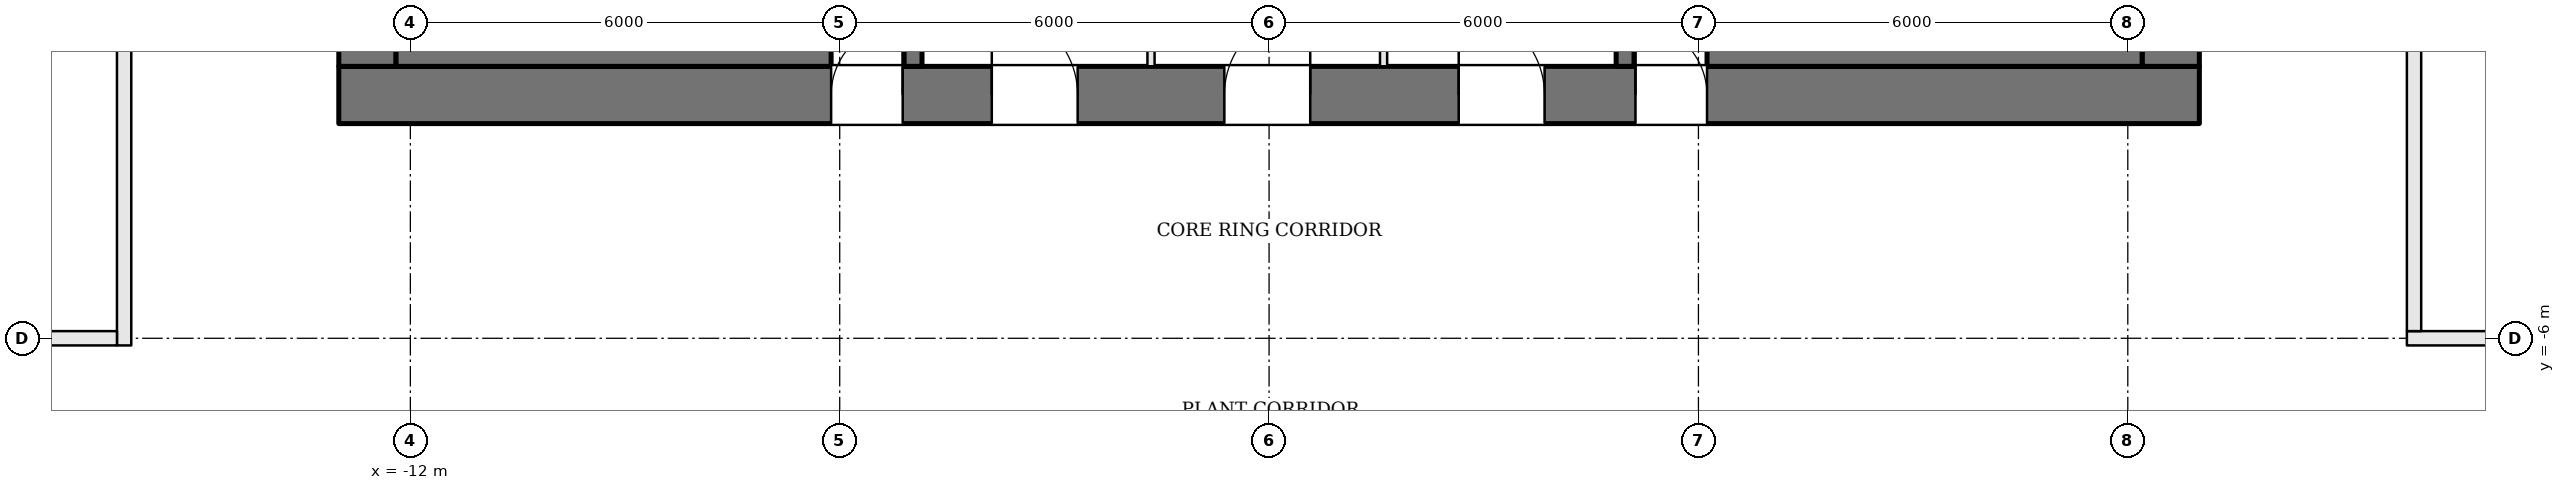
"""IFC4 building model, lengths in metres.
Left out: names, types, materials, properties, quantities, classifications, styles, units other than length and angle.
Written with IfcOpenShell. Run it as: python <this file> out.ifc"""

import sys

from ifc_helpers import new_model, si_unit, direction, frame, frame_2d, origin, place, context, subcontext, project, spatial, rectangle, extrude, element, fill, save


model = new_model("IFC4")
c1 = context("Model", 3, precision=1e-05, world=origin(), true_north=direction((0.0, 1.0)))
c2 = subcontext(c1, "Body", "Model", "MODEL_VIEW")
j1 = project(units=[si_unit("LENGTHUNIT", "METRE"), si_unit("PLANEANGLEUNIT", "RADIAN")], contexts=[c1])
p1 = place(None, origin())
s1 = spatial("IfcSite", under=j1, at=p1, CompositionType="ELEMENT")
p2 = place(p1, origin())
s2 = spatial("IfcBuilding", under=s1, at=p2, CompositionType="ELEMENT")
p3 = place(p2, frame((0.0, 0.0, 216.9)))
s3 = spatial("IfcBuildingStorey", under=s2, at=p3, CompositionType="ELEMENT", Elevation=216.9)
p4 = place(p3, frame((-13.0, -2.6, 0.0), z_axis=(0.0, 0.0, 1.0), x_axis=(1.0, 0.0, 0.0)))
e1 = element("IfcWall", 1, at=p4, inside=s3, PredefinedType="SHEAR", context=c2, shape_type="SweptSolid", body=[
    extrude(rectangle(XDim=26.0, YDim=0.8, at=frame_2d((13.0, 0.0))), origin(), (0.0, 0.0, 1.0), 4.5),
])
p5 = place(p4, frame((9.125, 0.0, 0.0)))
e2 = element("IfcOpeningElement", 2, at=p5, cuts=e1, PredefinedType="OPENING", context=c2, shape_type="SweptSolid", body=[
    extrude(rectangle(XDim=1.2, YDim=2.1, at=frame_2d((0.6, 1.05))), frame((0.0, 0.41, 0.0), z_axis=(0.0, -1.0, 0.0), x_axis=(1.0, 0.0, 0.0)), (0.0, 0.0, 1.0), 0.82),
])
p6 = place(p4, frame((12.375, 0.0, 0.0)))
e3 = element("IfcOpeningElement", 3, at=p6, cuts=e1, PredefinedType="OPENING", context=c2, shape_type="SweptSolid", body=[
    extrude(rectangle(XDim=1.2, YDim=2.1, at=frame_2d((0.6, 1.05))), frame((0.0, 0.41, 0.0), z_axis=(0.0, -1.0, 0.0), x_axis=(1.0, 0.0, 0.0)), (0.0, 0.0, 1.0), 0.82),
])
p7 = place(p4, frame((15.65, 0.0, 0.0)))
e4 = element("IfcOpeningElement", 4, at=p7, cuts=e1, PredefinedType="OPENING", context=c2, shape_type="SweptSolid", body=[
    extrude(rectangle(XDim=1.2, YDim=2.1, at=frame_2d((0.6, 1.05))), frame((0.0, 0.41, 0.0), z_axis=(0.0, -1.0, 0.0), x_axis=(1.0, 0.0, 0.0)), (0.0, 0.0, 1.0), 0.82),
])
p8 = place(p4, frame((6.88, 0.0, 0.0)))
e5 = element("IfcOpeningElement", 5, at=p8, cuts=e1, PredefinedType="OPENING", context=c2, shape_type="SweptSolid", body=[
    extrude(rectangle(XDim=1.0, YDim=2.1, at=frame_2d((0.5, 1.05))), frame((0.0, 0.41, 0.0), z_axis=(0.0, -1.0, 0.0), x_axis=(1.0, 0.0, 0.0)), (0.0, 0.0, 1.0), 0.82),
])
p9 = place(p4, frame((18.12, 0.0, 0.0)))
e6 = element("IfcOpeningElement", 6, at=p9, cuts=e1, PredefinedType="OPENING", context=c2, shape_type="SweptSolid", body=[
    extrude(rectangle(XDim=1.0, YDim=2.1, at=frame_2d((0.5, 1.05))), frame((0.0, 0.41, 0.0), z_axis=(0.0, -1.0, 0.0), x_axis=(1.0, 0.0, 0.0)), (0.0, 0.0, 1.0), 0.82),
])
p10 = place(p3, frame((12.6, -2.2, 0.0), z_axis=(0.0, 0.0, 1.0), x_axis=(0.0, 1.0, 0.0)))
e7 = element("IfcWall", 7, at=p10, inside=s3, PredefinedType="SHEAR", context=c2, shape_type="SweptSolid", body=[
    extrude(rectangle(XDim=13.4, YDim=0.8, at=frame_2d((6.7, 0.0))), origin(), (0.0, 0.0, 1.0), 4.5),
])
p11 = place(p10, frame((7.4, 0.0, 0.0)))
e8 = element("IfcOpeningElement", 8, at=p11, cuts=e7, PredefinedType="OPENING", context=c2, shape_type="SweptSolid", body=[
    extrude(rectangle(XDim=1.8, YDim=2.1, at=frame_2d((0.9, 1.05))), frame((0.0, 0.41, 0.0), z_axis=(0.0, -1.0, 0.0), x_axis=(1.0, 0.0, 0.0)), (0.0, 0.0, 1.0), 0.82),
])
p12 = place(p3, frame((-12.6, -2.2, 0.0), z_axis=(0.0, 0.0, 1.0), x_axis=(0.0, 1.0, 0.0)))
e9 = element("IfcWall", 9, at=p12, inside=s3, PredefinedType="SHEAR", context=c2, shape_type="SweptSolid", body=[
    extrude(rectangle(XDim=13.4, YDim=0.8, at=frame_2d((6.7, 0.0))), origin(), (0.0, 0.0, 1.0), 4.5),
])
p13 = place(p12, frame((4.2, 0.0, 0.0)))
e10 = element("IfcOpeningElement", 10, at=p13, cuts=e9, PredefinedType="OPENING", context=c2, shape_type="SweptSolid", body=[
    extrude(rectangle(XDim=1.8, YDim=2.1, at=frame_2d((0.9, 1.05))), frame((0.0, 0.41, 0.0), z_axis=(0.0, -1.0, 0.0), x_axis=(1.0, 0.0, 0.0)), (0.0, 0.0, 1.0), 0.82),
])
p14 = place(p3, frame((-4.975, -2.2, 0.0), z_axis=(0.0, 0.0, 1.0), x_axis=(0.0, 1.0, 0.0)))
e11 = element("IfcWall", 11, at=p14, inside=s3, PredefinedType="SOLIDWALL", context=c2, shape_type="SweptSolid", body=[
    extrude(rectangle(XDim=13.4, YDim=0.25, at=frame_2d((6.7, 0.0))), origin(), (0.0, 0.0, 1.0), 4.3),
])
p15 = place(p14, frame((5.25, 0.0, 0.0)))
e12 = element("IfcOpeningElement", 12, at=p15, cuts=e11, PredefinedType="OPENING", context=c2, shape_type="SweptSolid", body=[
    extrude(rectangle(XDim=1.2, YDim=2.1, at=frame_2d((0.6, 1.05))), frame((0.0, 0.135, 0.0), z_axis=(0.0, -1.0, 0.0), x_axis=(1.0, 0.0, 0.0)), (0.0, 0.0, 1.0), 0.27),
])
p16 = place(p3, frame((4.975, 11.2, 0.0), z_axis=(0.0, 0.0, 1.0), x_axis=(0.0, -1.0, 0.0)))
e13 = element("IfcWall", 13, at=p16, inside=s3, PredefinedType="SOLIDWALL", context=c2, shape_type="SweptSolid", body=[
    extrude(rectangle(XDim=13.4, YDim=0.25, at=frame_2d((6.7, 0.0))), origin(), (0.0, 0.0, 1.0), 4.3),
])
p17 = place(p16, frame((5.25, 0.0, 0.0)))
e14 = element("IfcOpeningElement", 14, at=p17, cuts=e13, PredefinedType="OPENING", context=c2, shape_type="SweptSolid", body=[
    extrude(rectangle(XDim=1.2, YDim=2.1, at=frame_2d((0.6, 1.05))), frame((0.0, 0.135, 0.0), z_axis=(0.0, -1.0, 0.0), x_axis=(1.0, 0.0, 0.0)), (0.0, 0.0, 1.0), 0.27),
])
for number, where, z_axis, x_axis in (
    (15, (-12.2, -1.9, 0.0), (0.0, 0.0, 1.0), (1.0, 0.0, 0.0)),
    (16, (12.2, -1.9, 0.0), (0.0, 0.0, 1.0), (-1.0, 0.0, 0.0)),
):
    element("IfcWall", number, at=place(p3, frame(where, z_axis=z_axis, x_axis=x_axis)), inside=s3, PredefinedType="SOLIDWALL", context=c2, shape_type="SweptSolid", body=[
        extrude(rectangle(XDim=6.08, YDim=0.6, at=frame_2d((3.04, 0.0))), origin(), (0.0, 0.0, 1.0), 4.3),
    ])
for number, where, z_axis, x_axis in (
    (17, (-1.65, -2.2, 0.0), (0.0, 0.0, 1.0), (0.0, 1.0, 0.0)),
    (18, (1.6, -2.2, 0.0), (0.0, 0.0, 1.0), (0.0, 1.0, 0.0)),
):
    element("IfcWall", number, at=place(p3, frame(where, z_axis=z_axis, x_axis=x_axis)), inside=s3, PredefinedType="PARTITIONING", context=c2, shape_type="SweptSolid", body=[
        extrude(rectangle(XDim=2.6, YDim=0.1, at=frame_2d((1.3, 0.0))), origin(), (0.0, 0.0, 1.0), 4.3),
    ])
p18 = place(p3, frame((-16.0, 13.047, 0.0), z_axis=(0.0, 0.0, 1.0), x_axis=(0.0, -1.0, 0.0)))
e19 = element("IfcWall", 19, at=p18, inside=s3, PredefinedType="PARTITIONING", context=c2, shape_type="SweptSolid", body=[
    extrude(rectangle(XDim=19.147, YDim=0.2, at=frame_2d((9.574, 0.0))), origin(), (0.0, 0.0, 1.0), 4.3),
])
p19 = place(p18, frame((7.647, 0.0, 0.0)))
e20 = element("IfcOpeningElement", 20, at=p19, cuts=e19, PredefinedType="OPENING", context=c2, shape_type="SweptSolid", body=[
    extrude(rectangle(XDim=1.8, YDim=2.1, at=frame_2d((0.9, 1.05))), frame((0.0, 0.11, 0.0), z_axis=(0.0, -1.0, 0.0), x_axis=(1.0, 0.0, 0.0)), (0.0, 0.0, 1.0), 0.22),
])
p20 = place(p3, frame((-16.1, -6.0, 0.0), z_axis=(0.0, 0.0, 1.0), x_axis=(-1.0, 0.0, 0.0)))
e21 = element("IfcWall", 21, at=p20, inside=s3, PredefinedType="PARTITIONING", context=c2, shape_type="SweptSolid", body=[
    extrude(rectangle(XDim=5.898, YDim=0.2, at=frame_2d((2.949, 0.0))), origin(), (0.0, 0.0, 1.0), 4.3),
])
p21 = place(p3, frame((22.038, -6.0, 0.0), z_axis=(0.0, 0.0, 1.0), x_axis=(-1.0, 0.0, 0.0)))
e22 = element("IfcWall", 22, at=p21, inside=s3, PredefinedType="PARTITIONING", context=c2, shape_type="SweptSolid", body=[
    extrude(rectangle(XDim=6.138, YDim=0.2, at=frame_2d((3.069, 0.0))), origin(), (0.0, 0.0, 1.0), 4.3),
])
p22 = place(p3, frame((16.0, -5.9, 0.0), z_axis=(0.0, 0.0, 1.0), x_axis=(0.0, 1.0, 0.0)))
e23 = element("IfcWall", 23, at=p22, inside=s3, PredefinedType="PARTITIONING", context=c2, shape_type="SweptSolid", body=[
    extrude(rectangle(XDim=19.152, YDim=0.2, at=frame_2d((9.576, 0.0))), origin(), (0.0, 0.0, 1.0), 4.3),
])
p23 = place(p22, frame((9.5, 0.0, 0.0)))
e24 = element("IfcOpeningElement", 24, at=p23, cuts=e23, PredefinedType="OPENING", context=c2, shape_type="SweptSolid", body=[
    extrude(rectangle(XDim=1.8, YDim=2.1, at=frame_2d((0.9, 1.05))), frame((0.0, 0.11, 0.0), z_axis=(0.0, -1.0, 0.0), x_axis=(1.0, 0.0, 0.0)), (0.0, 0.0, 1.0), 0.22),
])
p24 = place(p5, origin())
e25 = element("IfcDoor", 25, at=p24, inside=s3, OperationType="SINGLE_SWING_LEFT", PredefinedType="DOOR", context=c2, shape_type="SweptSolid", body=[
    extrude(rectangle(XDim=1.2, YDim=2.1, at=frame_2d((0.6, 1.05))), frame((0.0, 0.025, 0.0), z_axis=(0.0, -1.0, 0.0), x_axis=(1.0, 0.0, 0.0)), (0.0, 0.0, 1.0), 0.05),
])
fill(e2, e25)
p25 = place(p6, origin())
e26 = element("IfcDoor", 26, at=p25, inside=s3, OperationType="SINGLE_SWING_RIGHT", PredefinedType="DOOR", context=c2, shape_type="SweptSolid", body=[
    extrude(rectangle(XDim=1.2, YDim=2.1, at=frame_2d((0.6, 1.05))), frame((0.0, 0.025, 0.0), z_axis=(0.0, -1.0, 0.0), x_axis=(1.0, 0.0, 0.0)), (0.0, 0.0, 1.0), 0.05),
])
fill(e3, e26)
p26 = place(p7, origin())
e27 = element("IfcDoor", 27, at=p26, inside=s3, OperationType="SINGLE_SWING_LEFT", PredefinedType="DOOR", context=c2, shape_type="SweptSolid", body=[
    extrude(rectangle(XDim=1.2, YDim=2.1, at=frame_2d((0.6, 1.05))), frame((0.0, 0.025, 0.0), z_axis=(0.0, -1.0, 0.0), x_axis=(1.0, 0.0, 0.0)), (0.0, 0.0, 1.0), 0.05),
])
fill(e4, e27)
p27 = place(p8, origin())
e28 = element("IfcDoor", 28, at=p27, inside=s3, OperationType="SINGLE_SWING_RIGHT", PredefinedType="DOOR", context=c2, shape_type="SweptSolid", body=[
    extrude(rectangle(XDim=1.0, YDim=2.1, at=frame_2d((0.5, 1.05))), frame((0.0, 0.025, 0.0), z_axis=(0.0, -1.0, 0.0), x_axis=(1.0, 0.0, 0.0)), (0.0, 0.0, 1.0), 0.05),
])
fill(e5, e28)
p28 = place(p9, origin())
e29 = element("IfcDoor", 29, at=p28, inside=s3, OperationType="SINGLE_SWING_LEFT", PredefinedType="DOOR", context=c2, shape_type="SweptSolid", body=[
    extrude(rectangle(XDim=1.0, YDim=2.1, at=frame_2d((0.5, 1.05))), frame((0.0, 0.025, 0.0), z_axis=(0.0, -1.0, 0.0), x_axis=(1.0, 0.0, 0.0)), (0.0, 0.0, 1.0), 0.05),
])
fill(e6, e29)
save(model, sys.argv[1])
